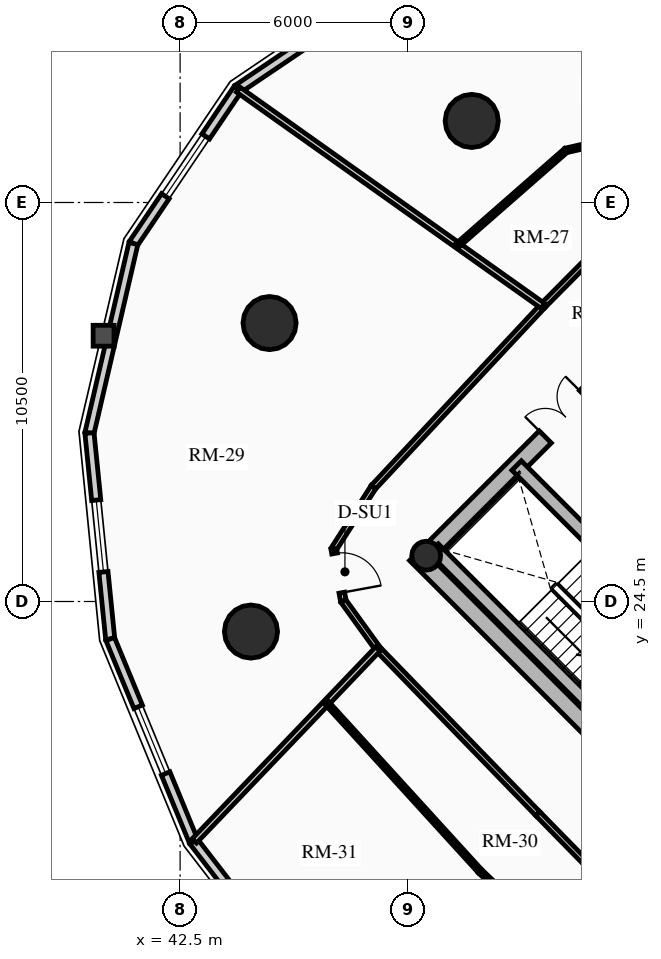
"""IFC4 building model, lengths in metres.
Left out: names, types, materials, properties, quantities, classifications, styles, units other than length and angle.
Written with IfcOpenShell. Run it as: python <this file> out.ifc"""

import sys

from ifc_helpers import new_model, si_unit, direction, frame, frame_2d, origin, origin_2d, place, context, subcontext, project, spatial, rectangle, circle, hollow_circle, extrude, source, transform, mapped, element, fill, save


model = new_model("IFC4")
c1 = context("Model", 3, precision=1e-05, world=origin(), true_north=direction((0.0, 1.0)))
c2 = subcontext(c1, "Body", "Model", "MODEL_VIEW")
j1 = project(units=[si_unit("LENGTHUNIT", "METRE"), si_unit("PLANEANGLEUNIT", "RADIAN")], contexts=[c1])
p1 = place(None, origin())
s1 = spatial("IfcSite", under=j1, at=p1, CompositionType="ELEMENT")
p2 = place(p1, origin())
s2 = spatial("IfcBuilding", under=s1, at=p2, CompositionType="ELEMENT")
p3 = place(p2, frame((0.0, 0.0, 105.07)))
s3 = spatial("IfcBuildingStorey", under=s2, at=p3, CompositionType="ELEMENT", Elevation=105.07)
p4 = place(p3, frame((58.737, 15.697, 0.0), z_axis=(0.0, 0.0, 1.0), x_axis=(-0.707106781187, 0.707106781187, 0.0)))
e1 = element("IfcWall", 1, at=p4, inside=s3, PredefinedType="SHEAR", context=c2, shape_type="SweptSolid", body=[
    extrude(rectangle(XDim=14.2, YDim=0.45, at=frame_2d((7.1, 0.0))), origin(), (0.0, 0.0, 1.0), 2.91),
])
p5 = place(p3, frame((48.856, 25.578, 0.0), z_axis=(0.0, 0.0, 1.0), x_axis=(0.707106781187, 0.707106781187, 0.0)))
e2 = element("IfcWall", 2, at=p5, inside=s3, PredefinedType="SHEAR", context=c2, shape_type="SweptSolid", body=[
    extrude(rectangle(XDim=10.7, YDim=0.45, at=frame_2d((5.35, 0.0))), origin(), (0.0, 0.0, 1.0), 2.91),
])
m1 = source(origin(), c2, "Body", "SweptSolid", [
    extrude(rectangle(XDim=1.5, YDim=2.02, at=frame_2d((0.75, 1.01))), frame((0.0, 0.235, 0.0), z_axis=(0.0, -1.0, 0.0), x_axis=(1.0, 0.0, 0.0)), (0.0, 0.0, 1.0), 0.47),
])
p6 = place(p5, frame((4.6, 0.0, 0.0)))
e3 = element("IfcOpeningElement", 3, at=p6, cuts=e2, PredefinedType="OPENING", context=c2, shape_type="MappedRepresentation", body=[
    mapped(m1, transform((0.0, 0.0, 0.0), x_axis=(1.0, 0.0, 0.0), y_axis=(0.0, 1.0, 0.0), z_axis=(0.0, 0.0, 1.0), scale=1.0)),
])
p7 = place(p3, frame((61.078, 18.355, 0.0), z_axis=(0.0, 0.0, 1.0), x_axis=(-0.707106781187, 0.707106781187, 0.0)))
e4 = element("IfcWall", 4, at=p7, inside=s3, PredefinedType="SHEAR", context=c2, shape_type="SweptSolid", body=[
    extrude(rectangle(XDim=13.75, YDim=0.35, at=frame_2d((6.875, 0.0))), origin(), (0.0, 0.0, 1.0), 2.91),
])
m2 = source(origin(), c2, "Body", "SweptSolid", [
    extrude(rectangle(XDim=1.1, YDim=2.015, at=frame_2d((0.55, 1.007))), frame((0.0, 0.185, 0.0), z_axis=(0.0, -1.0, 0.0), x_axis=(1.0, 0.0, 0.0)), (0.0, 0.0, 1.0), 0.37),
])
p8 = place(p7, frame((4.875, 0.0, 0.0)))
e5 = element("IfcOpeningElement", 5, at=p8, cuts=e4, PredefinedType="OPENING", context=c2, shape_type="MappedRepresentation", body=[
    mapped(m2, transform((0.0, 0.0, 0.0), x_axis=(1.0, 0.0, 0.0), y_axis=(0.0, 1.0, 0.0), z_axis=(0.0, 0.0, 1.0), scale=1.0)),
])
m3 = source(origin(), c2, "Body", "SweptSolid", [
    extrude(rectangle(XDim=1.15, YDim=2.02, at=frame_2d((0.575, 1.01))), frame((0.0, 0.185, 0.0), z_axis=(0.0, -1.0, 0.0), x_axis=(1.0, 0.0, 0.0)), (0.0, 0.0, 1.0), 0.37),
])
p9 = place(p7, frame((7.295, 0.0, 0.0)))
e6 = element("IfcOpeningElement", 6, at=p9, cuts=e4, PredefinedType="OPENING", context=c2, shape_type="MappedRepresentation", body=[
    mapped(m3, transform((0.0, 0.0, 0.0), x_axis=(1.0, 0.0, 0.0), y_axis=(0.0, 1.0, 0.0), z_axis=(0.0, 0.0, 1.0), scale=1.0)),
])
p10 = place(p3, frame((53.922, 21.141, 0.0), z_axis=(0.0, 0.0, 1.0), x_axis=(-0.707088616009, 0.707124945897, 0.0)))
e7 = element("IfcWall", 7, at=p10, inside=s3, PredefinedType="SHEAR", context=c2, shape_type="SweptSolid", body=[
    extrude(rectangle(XDim=6.72, YDim=0.35, at=frame_2d((3.36, 0.0))), origin(), (0.0, 0.0, 1.0), 2.91),
])
p11 = place(p3, frame((48.976, 25.706, 0.0), z_axis=(0.0, 0.0, 1.0), x_axis=(0.707106781187, 0.707106781187, 0.0)))
e8 = element("IfcColumn", 8, at=p11, inside=s3, PredefinedType="COLUMN", context=c2, shape_type="SweptSolid", body=[
    extrude(hollow_circle(Radius=0.38, WallThickness=0.032, at=origin_2d()), origin(), (0.0, 0.0, 1.0), 2.91),
])
for number, where, z_axis, x_axis in (
    (9, (50.173, 37.146, 0.0), (0.0, 0.0, 1.0), (1.0, 0.0, 0.0)),
    (10, (44.854, 31.827, 0.0), (0.0, 0.0, 1.0), (1.0, 0.0, 0.0)),
    (11, (44.365, 23.709, 0.0), (0.0, 0.0, 1.0), (1.0, 0.0, 0.0)),
):
    element("IfcColumn", number, at=place(p3, frame(where, z_axis=z_axis, x_axis=x_axis)), inside=s3, PredefinedType="USERDEFINED", context=c2, shape_type="SweptSolid", body=[
        extrude(circle(Radius=0.7, at=origin_2d()), origin(), (0.0, 0.0, 1.0), 2.91),
    ])
p12 = place(p3, frame((44.015, 37.985, 0.0), z_axis=(0.0, 0.0, 1.0), x_axis=(0.828781148131, 0.559572880421, 0.0)))
e12 = element("IfcWall", 12, at=p12, inside=s3, PredefinedType="SOLIDWALL", context=c2, shape_type="SweptSolid", body=[
    extrude(rectangle(XDim=4.905, YDim=0.24, at=frame_2d((2.452, 0.0))), origin(), (0.0, 0.0, 1.0), 2.179),
])
p13 = place(p3, frame((41.271, 33.92, 0.0), z_axis=(0.0, 0.0, 1.0), x_axis=(0.559572880421, 0.828781148131, 0.0)))
e13 = element("IfcWall", 13, at=p13, inside=s3, PredefinedType="SOLIDWALL", context=c2, shape_type="SweptSolid", body=[
    extrude(rectangle(XDim=4.905, YDim=0.24, at=frame_2d((2.452, 0.0))), origin(), (0.0, 0.0, 1.0), 2.179),
])
m4 = source(origin(), c2, "Body", "SweptSolid", [
    extrude(rectangle(XDim=1.9, YDim=1.35, at=frame_2d((0.95, 0.675))), frame((0.0, 0.13, 0.0), z_axis=(0.0, -1.0, 0.0), x_axis=(1.0, 0.0, 0.0)), (0.0, 0.0, 1.0), 0.26),
])
p14 = place(p13, frame((1.502, 0.0, 0.65)))
e14 = element("IfcOpeningElement", 14, at=p14, cuts=e13, PredefinedType="OPENING", context=c2, shape_type="MappedRepresentation", body=[
    mapped(m4, transform((0.0, 0.0, 0.0), x_axis=(1.0, 0.0, 0.0), y_axis=(0.0, 1.0, 0.0), z_axis=(0.0, 0.0, 1.0), scale=1.0)),
])
p15 = place(p3, frame((40.115, 28.933, 0.0), z_axis=(0.0, 0.0, 1.0), x_axis=(0.225834725257, 0.974165631126, 0.0)))
e15 = element("IfcWall", 15, at=p15, inside=s3, PredefinedType="SOLIDWALL", context=c2, shape_type="SweptSolid", body=[
    extrude(rectangle(XDim=5.119, YDim=0.24, at=frame_2d((2.56, 0.0))), origin(), (0.0, 0.0, 1.0), 2.179),
])
p16 = place(p3, frame((40.661, 23.513, 0.0), z_axis=(0.0, 0.0, 1.0), x_axis=(-0.10015591906, 0.994971754311, 0.0)))
e16 = element("IfcWall", 16, at=p16, inside=s3, PredefinedType="SOLIDWALL", context=c2, shape_type="SweptSolid", body=[
    extrude(rectangle(XDim=5.448, YDim=0.24, at=frame_2d((2.724, 0.0))), origin(), (0.0, 0.0, 1.0), 2.179),
])
p17 = place(p16, frame((1.774, 0.0, 0.65)))
e17 = element("IfcOpeningElement", 17, at=p17, cuts=e16, PredefinedType="OPENING", context=c2, shape_type="MappedRepresentation", body=[
    mapped(m4, transform((0.0, 0.0, 0.0), x_axis=(1.0, 0.0, 0.0), y_axis=(0.0, 1.0, 0.0), z_axis=(0.0, 0.0, 1.0), scale=1.0)),
])
p18 = place(p3, frame((42.855, 18.189, 0.0), z_axis=(0.0, 0.0, 1.0), x_axis=(-0.381027003055, 0.924563909604, 0.0)))
e18 = element("IfcWall", 18, at=p18, inside=s3, PredefinedType="SOLIDWALL", context=c2, shape_type="SweptSolid", body=[
    extrude(rectangle(XDim=5.758, YDim=0.24, at=frame_2d((2.879, 0.0))), origin(), (0.0, 0.0, 1.0), 2.179),
])
p19 = place(p18, frame((1.929, 0.0, 0.65)))
e19 = element("IfcOpeningElement", 19, at=p19, cuts=e18, PredefinedType="OPENING", context=c2, shape_type="MappedRepresentation", body=[
    mapped(m4, transform((0.0, 0.0, 0.0), x_axis=(1.0, 0.0, 0.0), y_axis=(0.0, 1.0, 0.0), z_axis=(0.0, 0.0, 1.0), scale=1.0)),
])
p20 = place(p3, frame((46.483, 13.483, 0.0), z_axis=(0.0, 0.0, 1.0), x_axis=(-0.61054437102, 0.791982052206, 0.0)))
e20 = element("IfcWall", 20, at=p20, inside=s3, PredefinedType="SOLIDWALL", context=c2, shape_type="SweptSolid", body=[
    extrude(rectangle(XDim=5.942, YDim=0.24, at=frame_2d((2.971, 0.0))), origin(), (0.0, 0.0, 1.0), 2.179),
])
p21 = place(p3, frame((54.427, 34.683, 0.0), z_axis=(0.0, 0.0, 1.0), x_axis=(-0.704178989986, -0.710022499687, 0.0)))
e21 = element("IfcWall", 21, at=p21, inside=s3, PredefinedType="PARTITIONING", context=c2, shape_type="SweptSolid", body=[
    extrude(rectangle(XDim=3.384, YDim=0.15, at=frame_2d((1.692, 0.0))), origin(), (0.0, 0.0, 1.0), 2.225),
])
p22 = place(p3, frame((52.043, 32.28, 0.0), z_axis=(0.0, 0.0, 1.0), x_axis=(-0.682606081633, -0.730786519661, 0.0)))
e22 = element("IfcWall", 22, at=p22, inside=s3, PredefinedType="PARTITIONING", context=c2, shape_type="SweptSolid", body=[
    extrude(rectangle(XDim=6.527, YDim=0.15, at=frame_2d((3.263, 0.0))), origin(), (0.0, 0.0, 1.0), 2.225),
])
p23 = place(p3, frame((47.588, 27.51, 0.0), z_axis=(0.0, 0.0, 1.0), x_axis=(-0.540202619347, -0.841534984449, 0.0)))
e23 = element("IfcWall", 23, at=p23, inside=s3, PredefinedType="PARTITIONING", context=c2, shape_type="SweptSolid", body=[
    extrude(rectangle(XDim=1.935, YDim=0.15, at=frame_2d((0.967, 0.0))), origin(), (0.0, 0.0, 1.0), 2.225),
])
p24 = place(p3, frame((46.543, 25.882, 0.0), z_axis=(0.0, 0.0, 1.0), x_axis=(0.181153502579, -0.983454832976, 0.0)))
e24 = element("IfcWall", 24, at=p24, inside=s3, PredefinedType="PARTITIONING", context=c2, shape_type="SweptSolid", body=[
    extrude(rectangle(XDim=1.392, YDim=0.15, at=frame_2d((0.696, 0.0))), origin(), (0.0, 0.0, 1.0), 2.225),
])
m5 = source(origin(), c2, "Body", "SweptSolid", [
    extrude(rectangle(XDim=1.05, YDim=2.015, at=frame_2d((0.525, 1.007))), frame((0.0, 0.085, 0.0), z_axis=(0.0, -1.0, 0.0), x_axis=(1.0, 0.0, 0.0)), (0.0, 0.0, 1.0), 0.17),
])
p25 = place(p24, frame((0.12, 0.0, 0.0)))
e25 = element("IfcOpeningElement", 25, at=p25, cuts=e24, PredefinedType="OPENING", context=c2, shape_type="MappedRepresentation", body=[
    mapped(m5, transform((0.0, 0.0, 0.0), x_axis=(1.0, 0.0, 0.0), y_axis=(0.0, 1.0, 0.0), z_axis=(0.0, 0.0, 1.0), scale=1.0)),
])
p26 = place(p3, frame((46.795, 24.513, 0.0), z_axis=(0.0, 0.0, 1.0), x_axis=(0.585628197524, -0.810579801294, 0.0)))
e26 = element("IfcWall", 26, at=p26, inside=s3, PredefinedType="PARTITIONING", context=c2, shape_type="SweptSolid", body=[
    extrude(rectangle(XDim=1.554, YDim=0.15, at=frame_2d((0.777, 0.0))), origin(), (0.0, 0.0, 1.0), 2.225),
])
p27 = place(p3, frame((47.706, 23.253, 0.0), z_axis=(0.0, 0.0, 1.0), x_axis=(0.696179266346, -0.717867974707, 0.0)))
e27 = element("IfcWall", 27, at=p27, inside=s3, PredefinedType="PARTITIONING", context=c2, shape_type="SweptSolid", body=[
    extrude(rectangle(XDim=6.045, YDim=0.15, at=frame_2d((3.022, 0.0))), origin(), (0.0, 0.0, 1.0), 2.655),
])
p28 = place(p3, frame((51.914, 18.914, 0.0), z_axis=(0.0, 0.0, 1.0), x_axis=(0.699999313799, -0.714143515465, 0.0)))
e28 = element("IfcWall", 28, at=p28, inside=s3, PredefinedType="PARTITIONING", context=c2, shape_type="SweptSolid", body=[
    extrude(rectangle(XDim=6.162, YDim=0.15, at=frame_2d((3.081, 0.0))), origin(), (0.0, 0.0, 1.0), 2.225),
])
p29 = place(p3, frame((52.043, 32.28, 0.0), z_axis=(0.0, 0.0, 1.0), x_axis=(-0.81534487613, 0.578975589268, 0.0)))
e29 = element("IfcWall", 29, at=p29, inside=s3, PredefinedType="PARTITIONING", context=c2, shape_type="SweptSolid", body=[
    extrude(rectangle(XDim=9.829, YDim=0.16, at=frame_2d((4.915, 0.0))), origin(), (0.0, 0.0, 1.0), 2.179),
])
p30 = place(p3, frame((47.706, 23.253, 0.0), z_axis=(0.0, 0.0, 1.0), x_axis=(-0.691027649154, -0.722828325472, 0.0)))
e30 = element("IfcWall", 30, at=p30, inside=s3, PredefinedType="PARTITIONING", context=c2, shape_type="SweptSolid", body=[
    extrude(rectangle(XDim=6.994, YDim=0.16, at=frame_2d((3.497, 0.0))), origin(), (0.0, 0.0, 1.0), 2.179),
])
p31 = place(p3, frame((55.168, 36.948, 0.0), z_axis=(0.0, 0.0, 1.0), x_axis=(-0.974677367116, -0.223615808993, 0.0)))
e31 = element("IfcWall", 31, at=p31, inside=s3, PredefinedType="PARTITIONING", context=c2, shape_type="SweptSolid", body=[
    extrude(rectangle(XDim=2.581, YDim=0.125, at=frame_2d((1.291, 0.0))), origin(), (0.0, 0.0, 1.0), 2.225),
])
m6 = source(origin(), c2, "Body", "SweptSolid", [
    extrude(rectangle(XDim=0.9, YDim=2.005, at=frame_2d((0.45, 1.002))), frame((0.0, 0.073, 0.0), z_axis=(0.0, -1.0, 0.0), x_axis=(1.0, 0.0, 0.0)), (0.0, 0.0, 1.0), 0.145),
])
p32 = place(p31, frame((0.841, 0.0, 0.0)))
e32 = element("IfcOpeningElement", 32, at=p32, cuts=e31, PredefinedType="OPENING", context=c2, shape_type="MappedRepresentation", body=[
    mapped(m6, transform((0.0, 0.0, 0.0), x_axis=(1.0, 0.0, 0.0), y_axis=(0.0, 1.0, 0.0), z_axis=(0.0, 0.0, 1.0), scale=1.0)),
])
p33 = place(p3, frame((52.652, 36.371, 0.0), z_axis=(0.0, 0.0, 1.0), x_axis=(-0.752401146533, -0.658705180408, 0.0)))
e33 = element("IfcWall", 33, at=p33, inside=s3, PredefinedType="PARTITIONING", context=c2, shape_type="SweptSolid", body=[
    extrude(rectangle(XDim=3.791, YDim=0.125, at=frame_2d((1.896, 0.0))), origin(), (0.0, 0.0, 1.0), 2.225),
])
p34 = place(p3, frame((46.352, 21.838, 0.0), z_axis=(0.0, 0.0, 1.0), x_axis=(0.673416949194, -0.739262884594, 0.0)))
e34 = element("IfcWall", 34, at=p34, inside=s3, PredefinedType="PARTITIONING", context=c2, shape_type="SweptSolid", body=[
    extrude(rectangle(XDim=6.007, YDim=0.125, at=frame_2d((3.003, 0.0))), origin(), (0.0, 0.0, 1.0), 2.655),
])
p35 = place(p3, frame((50.397, 17.397, 0.0), z_axis=(0.0, 0.0, 1.0), x_axis=(0.726427828833, -0.687242758781, 0.0)))
e35 = element("IfcWall", 35, at=p35, inside=s3, PredefinedType="PARTITIONING", context=c2, shape_type="SweptSolid", body=[
    extrude(rectangle(XDim=6.087, YDim=0.125, at=frame_2d((3.043, 0.0))), origin(), (0.0, 0.0, 1.0), 2.225),
])
p36 = place(p35, frame((2.594, 0.0, 0.0)))
e36 = element("IfcOpeningElement", 36, at=p36, cuts=e35, PredefinedType="OPENING", context=c2, shape_type="MappedRepresentation", body=[
    mapped(m6, transform((0.0, 0.0, 0.0), x_axis=(1.0, 0.0, 0.0), y_axis=(0.0, 1.0, 0.0), z_axis=(0.0, 0.0, 1.0), scale=1.0)),
])
m7 = source(origin(), c2, "Body", "SweptSolid", [
    extrude(rectangle(XDim=1.9, YDim=1.35, at=frame_2d((0.95, 0.675))), frame((0.0, 0.03, 0.0), z_axis=(0.0, -1.0, 0.0), x_axis=(1.0, 0.0, 0.0)), (0.0, 0.0, 1.0), 0.06),
])
p37 = place(p14, origin())
e37 = element("IfcWindow", 37, at=p37, inside=s3, PartitioningType="DOUBLE_PANEL_VERTICAL", PredefinedType="WINDOW", context=c2, shape_type="MappedRepresentation", body=[
    mapped(m7, transform((0.0, 0.0, 0.0), x_axis=(1.0, 0.0, 0.0), y_axis=(0.0, 1.0, 0.0), z_axis=(0.0, 0.0, 1.0), scale=1.0)),
])
fill(e14, e37)
p38 = place(p17, origin())
e38 = element("IfcWindow", 38, at=p38, inside=s3, PartitioningType="DOUBLE_PANEL_VERTICAL", PredefinedType="WINDOW", context=c2, shape_type="MappedRepresentation", body=[
    mapped(m7, transform((0.0, 0.0, 0.0), x_axis=(1.0, 0.0, 0.0), y_axis=(0.0, 1.0, 0.0), z_axis=(0.0, 0.0, 1.0), scale=1.0)),
])
fill(e17, e38)
p39 = place(p19, origin())
e39 = element("IfcWindow", 39, at=p39, inside=s3, PartitioningType="DOUBLE_PANEL_VERTICAL", PredefinedType="WINDOW", context=c2, shape_type="MappedRepresentation", body=[
    mapped(m7, transform((0.0, 0.0, 0.0), x_axis=(1.0, 0.0, 0.0), y_axis=(0.0, 1.0, 0.0), z_axis=(0.0, 0.0, 1.0), scale=1.0)),
])
fill(e19, e39)
m8 = source(origin(), c2, "Body", "SweptSolid", [
    extrude(rectangle(XDim=1.5, YDim=2.02, at=frame_2d((0.75, 1.01))), frame((0.0, 0.025, 0.0), z_axis=(0.0, -1.0, 0.0), x_axis=(1.0, 0.0, 0.0)), (0.0, 0.0, 1.0), 0.05),
])
p40 = place(p6, origin())
e40 = element("IfcDoor", 40, at=p40, inside=s3, OperationType="DOUBLE_DOOR_SINGLE_SWING", PredefinedType="DOOR", context=c2, shape_type="MappedRepresentation", body=[
    mapped(m8, transform((0.0, 0.0, 0.0), x_axis=(1.0, 0.0, 0.0), y_axis=(0.0, 1.0, 0.0), z_axis=(0.0, 0.0, 1.0), scale=1.0)),
])
fill(e3, e40)
m9 = source(origin(), c2, "Body", "SweptSolid", [
    extrude(rectangle(XDim=1.05, YDim=2.015, at=frame_2d((0.525, 1.007))), frame((0.0, 0.025, 0.0), z_axis=(0.0, -1.0, 0.0), x_axis=(1.0, 0.0, 0.0)), (0.0, 0.0, 1.0), 0.05),
])
p41 = place(p25, origin())
e41 = element("IfcDoor", 41, at=p41, inside=s3, OperationType="SINGLE_SWING_RIGHT", PredefinedType="DOOR", context=c2, shape_type="MappedRepresentation", body=[
    mapped(m9, transform((0.0, 0.0, 0.0), x_axis=(1.0, 0.0, 0.0), y_axis=(0.0, 1.0, 0.0), z_axis=(0.0, 0.0, 1.0), scale=1.0)),
])
fill(e25, e41)
save(model, sys.argv[1])
